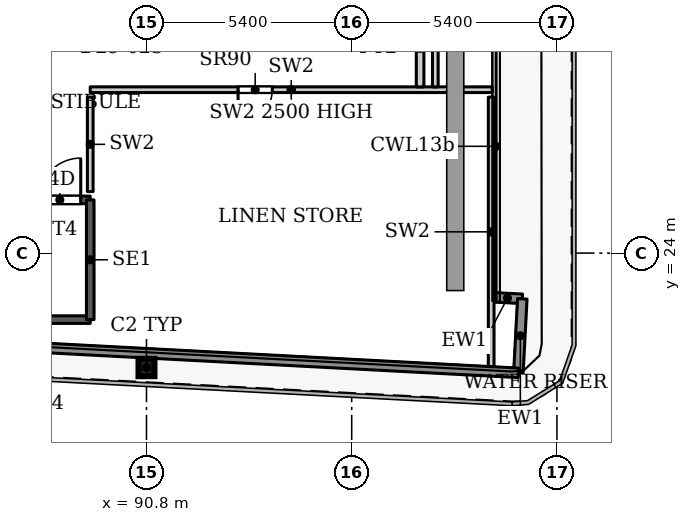
"""IFC4 building model, lengths in metres.
Left out: names, types, materials, properties, quantities, classifications, styles, units other than length and angle.
Written with IfcOpenShell. Run it as: python <this file> out.ifc"""

import sys

from ifc_helpers import new_model, si_unit, direction, frame, frame_2d, origin, origin_2d, place, context, subcontext, project, spatial, rectangle, i_section, extrude, source, transform, mapped, element, fill, save


model = new_model("IFC4")
c1 = context("Model", 3, precision=1e-05, world=origin(), true_north=direction((0.0, 1.0)))
c2 = subcontext(c1, "Body", "Model", "MODEL_VIEW")
j1 = project(units=[si_unit("LENGTHUNIT", "METRE"), si_unit("PLANEANGLEUNIT", "RADIAN")], contexts=[c1])
p1 = place(None, origin())
s1 = spatial("IfcSite", under=j1, at=p1, CompositionType="ELEMENT")
p2 = place(p1, origin())
s2 = spatial("IfcBuilding", under=s1, at=p2, CompositionType="ELEMENT")
p3 = place(p2, frame((0.0, 0.0, 125.3)))
s3 = spatial("IfcBuildingStorey", under=s2, at=p3, CompositionType="ELEMENT", Elevation=125.3)
p4 = place(p3, frame((90.8, 20.99, 0.0), z_axis=(0.0, 0.0, 1.0), x_axis=(1.0, 0.0, 0.0)))
e1 = element("IfcColumn", 1, at=p4, inside=s3, PredefinedType="COLUMN", context=c2, shape_type="SweptSolid", body=[
    extrude(i_section(OverallWidth=0.418, OverallDepth=0.455, WebThickness=0.042, FlangeThickness=0.068, FilletRadius=0.014, at=origin_2d()), origin(), (0.0, 0.0, 1.0), 3.9),
])
p5 = place(p3, frame((99.907, 22.839, 0.0), z_axis=(0.0, 0.0, 1.0), x_axis=(0.998561284263, -0.053622398031, 0.0)))
e2 = element("IfcWall", 2, at=p5, inside=s3, PredefinedType="SOLIDWALL", context=c2, shape_type="SweptSolid", body=[
    extrude(rectangle(XDim=0.783, YDim=0.25, at=frame_2d((0.392, 0.0))), origin(), (0.0, 0.0, 1.0), 3.75),
])
p6 = place(p3, frame((100.689, 22.797, 0.0), z_axis=(0.0, 0.0, 1.0), x_axis=(-0.052841433274, -0.998602915542, 0.0)))
e3 = element("IfcWall", 3, at=p6, inside=s3, PredefinedType="SOLIDWALL", context=c2, shape_type="SweptSolid", body=[
    extrude(rectangle(XDim=1.95, YDim=0.25, at=frame_2d((0.975, 0.0))), origin(), (0.0, 0.0, 1.0), 3.75),
])
p7 = place(p3, frame((100.586, 20.85, 0.0), z_axis=(0.0, 0.0, 1.0), x_axis=(-0.99861746497, 0.052565755559, 0.0)))
e4 = element("IfcWall", 4, at=p7, inside=s3, PredefinedType="SOLIDWALL", context=c2, shape_type="SweptSolid", body=[
    extrude(rectangle(XDim=66.639, YDim=0.25, at=frame_2d((33.319, 0.0))), origin(), (0.0, 0.0, 1.0), 3.75),
])
p8 = place(p3, frame((80.16, 22.25, 0.0), z_axis=(0.0, 0.0, 1.0), x_axis=(1.0, 0.0, 0.0)))
e5 = element("IfcWall", 5, at=p8, inside=s3, PredefinedType="SHEAR", context=c2, shape_type="SweptSolid", body=[
    extrude(rectangle(XDim=9.16, YDim=0.2, at=frame_2d((4.58, 0.0))), origin(), (0.0, 0.0, 1.0), 3.9),
])
p9 = place(p3, frame((80.16, 25.4, 0.0), z_axis=(0.0, 0.0, 1.0), x_axis=(1.0, 0.0, 0.0)))
e6 = element("IfcWall", 6, at=p9, inside=s3, PredefinedType="SHEAR", context=c2, shape_type="SweptSolid", body=[
    extrude(rectangle(XDim=9.16, YDim=0.2, at=frame_2d((4.58, 0.0))), origin(), (0.0, 0.0, 1.0), 3.9),
])
p10 = place(p9, frame((7.81, 0.0, 0.0)))
e7 = element("IfcOpeningElement", 7, at=p10, cuts=e6, PredefinedType="OPENING", context=c2, shape_type="SweptSolid", body=[
    extrude(rectangle(XDim=1.1, YDim=2.2, at=frame_2d((0.55, 1.1))), frame((0.0, 0.11, 0.0), z_axis=(0.0, -1.0, 0.0), x_axis=(1.0, 0.0, 0.0)), (0.0, 0.0, 1.0), 0.22),
])
p11 = place(p3, frame((89.32, 22.25, 0.0), z_axis=(0.0, 0.0, 1.0), x_axis=(0.0, 1.0, 0.0)))
e8 = element("IfcWall", 8, at=p11, inside=s3, PredefinedType="SHEAR", context=c2, shape_type="SweptSolid", body=[
    extrude(rectangle(XDim=3.15, YDim=0.2, at=frame_2d((1.575, 0.0))), origin(), (0.0, 0.0, 1.0), 3.9),
])
p12 = place(p3, frame((89.32, 28.3, 0.0), z_axis=(0.0, 0.0, 1.0), x_axis=(1.0, 0.0, 0.0)))
e9 = element("IfcWall", 9, at=p12, inside=s3, PredefinedType="PARTITIONING", context=c2, shape_type="SweptSolid", body=[
    extrude(rectangle(XDim=10.578, YDim=0.15, at=frame_2d((5.289, 0.0))), origin(), (0.0, 0.0, 1.0), 2.5),
])
p13 = place(p12, frame((3.89, 0.0, 0.0)))
e10 = element("IfcOpeningElement", 10, at=p13, cuts=e9, PredefinedType="OPENING", context=c2, shape_type="SweptSolid", body=[
    extrude(rectangle(XDim=0.9, YDim=2.2, at=frame_2d((0.45, 1.1))), frame((0.0, 0.085, 0.0), z_axis=(0.0, -1.0, 0.0), x_axis=(1.0, 0.0, 0.0)), (0.0, 0.0, 1.0), 0.17),
])
p14 = place(p3, frame((89.32, 25.62, 0.0), z_axis=(0.0, 0.0, 1.0), x_axis=(0.0, 1.0, 0.0)))
e11 = element("IfcWall", 11, at=p14, inside=s3, PredefinedType="PARTITIONING", context=c2, shape_type="SweptSolid", body=[
    extrude(rectangle(XDim=2.485, YDim=0.15, at=frame_2d((1.242, 0.0))), origin(), (0.0, 0.0, 1.0), 3.9),
])
p15 = place(p3, frame((99.87, 21.015, 0.0), z_axis=(0.0, 0.0, 1.0), x_axis=(0.0, 1.0, 0.0)))
e12 = element("IfcWall", 12, at=p15, inside=s3, PredefinedType="PARTITIONING", context=c2, shape_type="SweptSolid", body=[
    extrude(rectangle(XDim=7.09, YDim=0.15, at=frame_2d((3.545, 0.0))), origin(), (0.0, 0.0, 1.0), 3.9),
])
p16 = place(p3, frame((98.0, 28.374, 0.0), z_axis=(0.0, 0.0, 1.0), x_axis=(0.0, 1.0, 0.0)))
e13 = element("IfcWall", 13, at=p16, inside=s3, PredefinedType="PARTITIONING", context=c2, shape_type="SweptSolid", body=[
    extrude(rectangle(XDim=2.026, YDim=0.2, at=frame_2d((1.013, 0.0))), origin(), (0.0, 0.0, 1.0), 3.6),
])
p17 = place(p3, frame((98.4, 28.374, 0.0), z_axis=(0.0, 0.0, 1.0), x_axis=(0.0, 1.0, 0.0)))
e14 = element("IfcWall", 14, at=p17, inside=s3, PredefinedType="PARTITIONING", context=c2, shape_type="SweptSolid", body=[
    extrude(rectangle(XDim=5.251, YDim=0.15, at=frame_2d((2.625, 0.0))), origin(), (0.0, 0.0, 1.0), 3.6),
])
m1 = source(origin(), c2, "Body", "SweptSolid", [
    extrude(rectangle(XDim=0.9, YDim=2.2, at=frame_2d((0.45, 1.1))), frame((0.0, 0.025, 0.0), z_axis=(0.0, -1.0, 0.0), x_axis=(1.0, 0.0, 0.0)), (0.0, 0.0, 1.0), 0.05),
])
p18 = place(p13, origin())
e15 = element("IfcDoor", 15, at=p18, inside=s3, OperationType="SINGLE_SWING_RIGHT", PredefinedType="DOOR", context=c2, shape_type="MappedRepresentation", body=[
    mapped(m1, transform((0.0, 0.0, 0.0), x_axis=(1.0, 0.0, 0.0), y_axis=(0.0, 1.0, 0.0), z_axis=(0.0, 0.0, 1.0), scale=1.0)),
])
fill(e10, e15)
m2 = source(origin(), c2, "Body", "SweptSolid", [
    extrude(rectangle(XDim=1.1, YDim=2.2, at=frame_2d((0.55, 1.1))), frame((0.0, 0.025, 0.0), z_axis=(0.0, -1.0, 0.0), x_axis=(1.0, 0.0, 0.0)), (0.0, 0.0, 1.0), 0.05),
])
p19 = place(p10, origin())
e16 = element("IfcDoor", 16, at=p19, inside=s3, OperationType="SINGLE_SWING_LEFT", PredefinedType="DOOR", context=c2, shape_type="MappedRepresentation", body=[
    mapped(m2, transform((0.0, 0.0, 0.0), x_axis=(1.0, 0.0, 0.0), y_axis=(0.0, 1.0, 0.0), z_axis=(0.0, 0.0, 1.0), scale=1.0)),
])
fill(e7, e16)
save(model, sys.argv[1])
